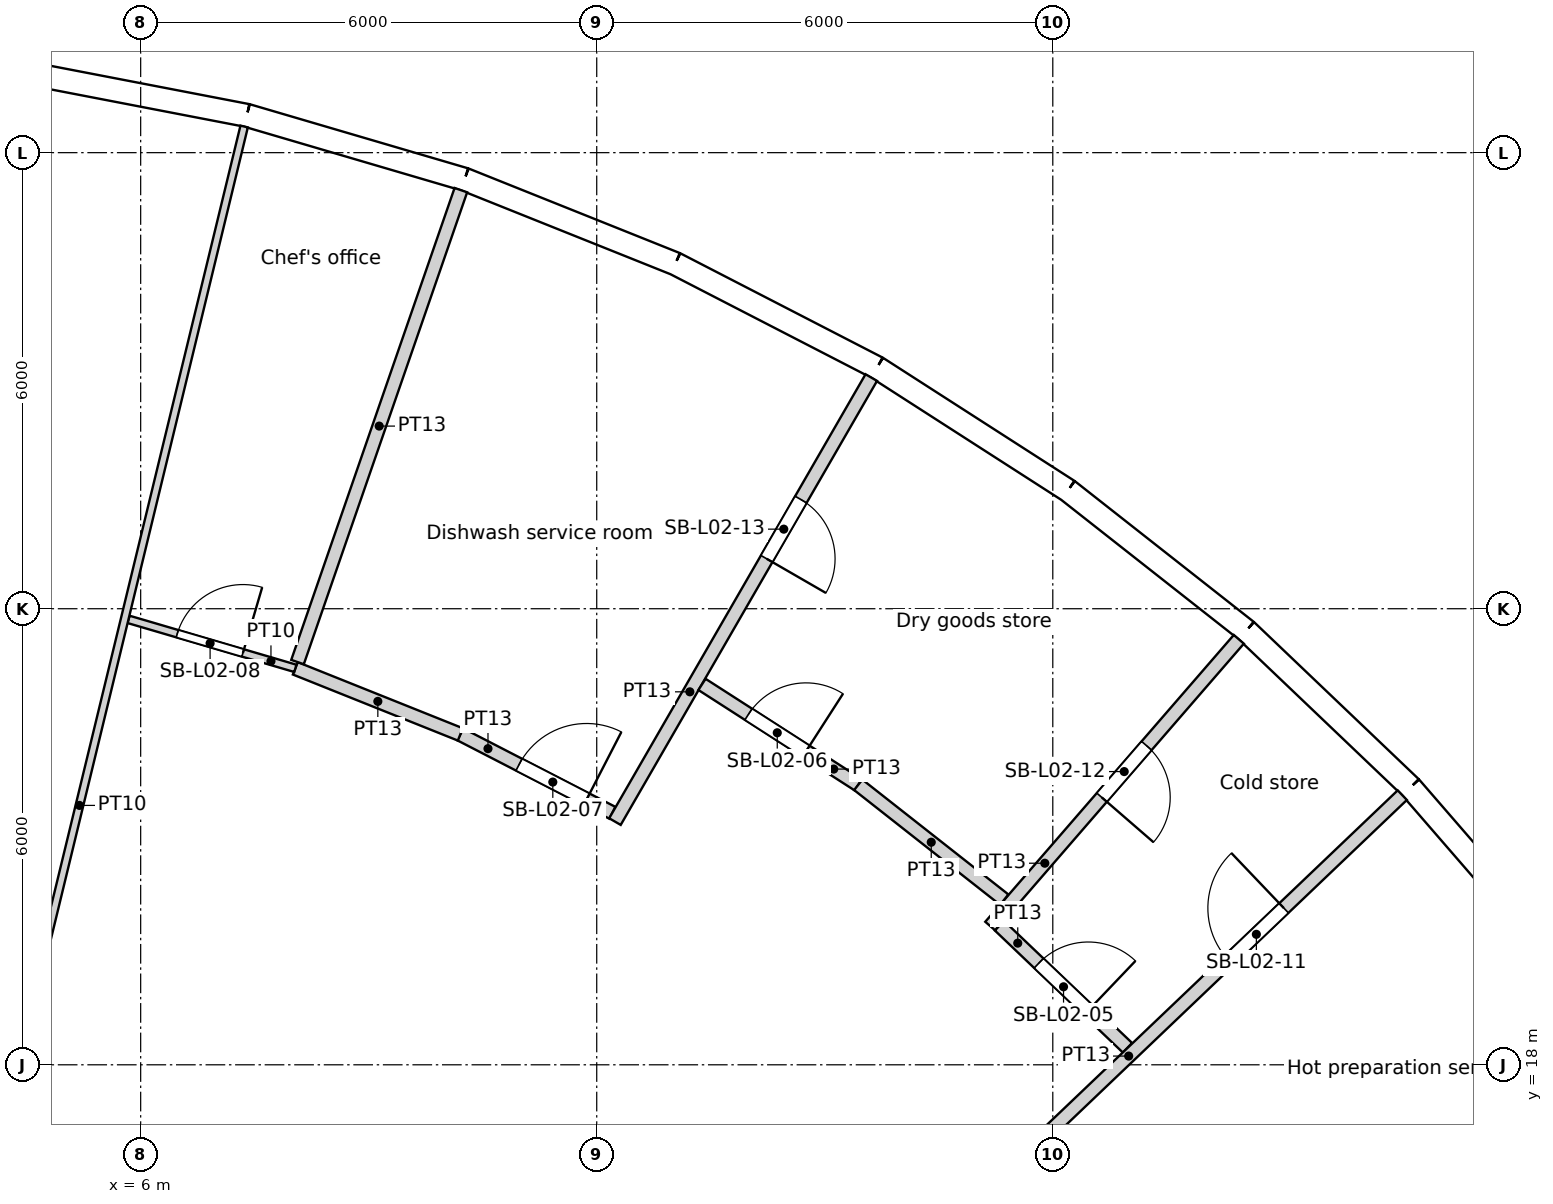
"""IFC4 building model, lengths in metres.
Left out: names, types, materials, properties, quantities, classifications, styles, units other than length and angle.
Written with IfcOpenShell. Run it as: python <this file> out.ifc"""

import sys

from ifc_helpers import new_model, si_unit, direction, frame, frame_2d, origin, origin_2d, place, context, subcontext, project, spatial, rectangle, circle, extrude, element, fill, save


model = new_model("IFC4")
c1 = context("Model", 3, precision=1e-05, world=origin(), true_north=direction((0.0, 1.0)))
c2 = subcontext(c1, "Body", "Model", "MODEL_VIEW")
j1 = project(units=[si_unit("LENGTHUNIT", "METRE"), si_unit("PLANEANGLEUNIT", "RADIAN")], contexts=[c1])
p1 = place(None, origin())
s1 = spatial("IfcSite", under=j1, at=p1, CompositionType="ELEMENT")
p2 = place(p1, origin())
s2 = spatial("IfcBuilding", under=s1, at=p2, CompositionType="ELEMENT")
p3 = place(p2, frame((0.0, 0.0, 13.8)))
s3 = spatial("IfcBuildingStorey", under=s2, at=p3, CompositionType="ELEMENT", Elevation=13.8)
for number, where, z_axis, x_axis in (
    (1, (21.911, 20.892, 0.0), (0.0, 0.0, 1.0), (1.0, 0.0, 0.0)),
    (2, (17.561, 24.661, 0.0), (0.0, 0.0, 1.0), (1.0, 0.0, 0.0)),
    (3, (12.576, 27.539, 0.0), (0.0, 0.0, 1.0), (1.0, 0.0, 0.0)),
    (4, (7.137, 29.421, 0.0), (0.0, 0.0, 1.0), (1.0, 0.0, 0.0)),
):
    element("IfcColumn", number, at=place(p3, frame(where, z_axis=z_axis, x_axis=x_axis)), inside=s3, PredefinedType="COLUMN", context=c2, shape_type="SweptSolid", body=[
        extrude(circle(Radius=0.7, at=origin_2d()), origin(), (0.0, 0.0, 1.0), 4.8),
    ])
for number, where, z_axis, x_axis in (
    (5, (14.659, 19.69, 0.0), (0.0, 0.0, 1.0), (1.0, 0.0, 0.0)),
    (6, (9.723, 22.54, 0.0), (0.0, 0.0, 1.0), (1.0, 0.0, 0.0)),
    (7, (4.263, 24.175, 0.0), (0.0, 0.0, 1.0), (1.0, 0.0, 0.0)),
):
    element("IfcColumn", number, at=place(p3, frame(where, z_axis=z_axis, x_axis=x_axis)), inside=s3, PredefinedType="COLUMN", context=c2, shape_type="SweptSolid", body=[
        extrude(circle(Radius=0.75, at=origin_2d()), origin(), (0.0, 0.0, 1.0), 4.8),
    ])
p4 = place(p3, frame((6.876, 17.521, 0.0), z_axis=(0.0, 0.0, 1.0), x_axis=(1.0, 0.0, 0.0)))
e8 = element("IfcColumn", 8, at=p4, inside=s3, PredefinedType="COLUMN", context=c2, shape_type="SweptSolid", body=[
    extrude(circle(Radius=0.8, at=origin_2d()), origin(), (0.0, 0.0, 1.0), 4.8),
])
p5 = place(p3, frame((24.662, 19.394, 0.0), z_axis=(0.0, 0.0, 1.0), x_axis=(-0.654809121128, 0.755794294029, 0.0)))
e9 = element("IfcWall", 9, at=p5, inside=s3, PredefinedType="SOLIDWALL", context=c2, shape_type="SweptSolid", body=[
    extrude(rectangle(XDim=2.986, YDim=0.3, at=frame_2d((1.493, 0.0))), origin(), (0.0, 0.0, 1.0), 4.35),
])
p6 = place(p5, frame((1.493, 0.0, 2.0)))
e10 = element("IfcOpeningElement", 10, at=p6, cuts=e9, PredefinedType="OPENING", context=c2, shape_type="SweptSolid", body=[
    extrude(circle(Radius=1.2, at=origin_2d()), frame((0.0, 0.16, 0.0), z_axis=(0.0, -1.0, 0.0), x_axis=(1.0, 0.0, 0.0)), (0.0, 0.0, 1.0), 0.32),
])
p7 = place(p3, frame((22.707, 21.651, 0.0), z_axis=(0.0, 0.0, 1.0), x_axis=(-0.723750841228, 0.690061388444, 0.0)))
e11 = element("IfcWall", 11, at=p7, inside=s3, PredefinedType="SOLIDWALL", context=c2, shape_type="SweptSolid", body=[
    extrude(rectangle(XDim=2.986, YDim=0.3, at=frame_2d((1.493, 0.0))), origin(), (0.0, 0.0, 1.0), 4.35),
])
p8 = place(p7, frame((1.493, 0.0, 2.0)))
e12 = element("IfcOpeningElement", 12, at=p8, cuts=e11, PredefinedType="OPENING", context=c2, shape_type="SweptSolid", body=[
    extrude(circle(Radius=1.2, at=origin_2d()), frame((0.0, 0.16, 0.0), z_axis=(0.0, -1.0, 0.0), x_axis=(1.0, 0.0, 0.0)), (0.0, 0.0, 1.0), 0.32),
])
p9 = place(p3, frame((20.546, 23.711, 0.0), z_axis=(0.0, 0.0, 1.0), x_axis=(-0.786043032847, 0.618171780747, 0.0)))
e13 = element("IfcWall", 13, at=p9, inside=s3, PredefinedType="SOLIDWALL", context=c2, shape_type="SweptSolid", body=[
    extrude(rectangle(XDim=2.986, YDim=0.3, at=frame_2d((1.493, 0.0))), origin(), (0.0, 0.0, 1.0), 4.35),
])
p10 = place(p9, frame((1.493, 0.0, 2.0)))
e14 = element("IfcOpeningElement", 14, at=p10, cuts=e13, PredefinedType="OPENING", context=c2, shape_type="SweptSolid", body=[
    extrude(circle(Radius=1.2, at=origin_2d()), frame((0.0, 0.16, 0.0), z_axis=(0.0, -1.0, 0.0), x_axis=(1.0, 0.0, 0.0)), (0.0, 0.0, 1.0), 0.32),
])
p11 = place(p3, frame((18.199, 25.557, 0.0), z_axis=(0.0, 0.0, 1.0), x_axis=(-0.841242231846, 0.540658401727, 0.0)))
e15 = element("IfcWall", 15, at=p11, inside=s3, PredefinedType="SOLIDWALL", context=c2, shape_type="SweptSolid", body=[
    extrude(rectangle(XDim=2.986, YDim=0.3, at=frame_2d((1.493, 0.0))), origin(), (0.0, 0.0, 1.0), 4.35),
])
p12 = place(p11, frame((1.493, 0.0, 2.0)))
e16 = element("IfcOpeningElement", 16, at=p12, cuts=e15, PredefinedType="OPENING", context=c2, shape_type="SweptSolid", body=[
    extrude(circle(Radius=1.2, at=origin_2d()), frame((0.0, 0.16, 0.0), z_axis=(0.0, -1.0, 0.0), x_axis=(1.0, 0.0, 0.0)), (0.0, 0.0, 1.0), 0.32),
])
p13 = place(p3, frame((15.687, 27.171, 0.0), z_axis=(0.0, 0.0, 1.0), x_axis=(-0.888831268481, 0.458234630043, 0.0)))
e17 = element("IfcWall", 17, at=p13, inside=s3, PredefinedType="SOLIDWALL", context=c2, shape_type="SweptSolid", body=[
    extrude(rectangle(XDim=2.986, YDim=0.3, at=frame_2d((1.493, 0.0))), origin(), (0.0, 0.0, 1.0), 4.35),
])
p14 = place(p13, frame((1.493, 0.0, 2.0)))
e18 = element("IfcOpeningElement", 18, at=p14, cuts=e17, PredefinedType="OPENING", context=c2, shape_type="SweptSolid", body=[
    extrude(circle(Radius=1.2, at=origin_2d()), frame((0.0, 0.16, 0.0), z_axis=(0.0, -1.0, 0.0), x_axis=(1.0, 0.0, 0.0)), (0.0, 0.0, 1.0), 0.32),
])
p15 = place(p3, frame((13.033, 28.539, 0.0), z_axis=(0.0, 0.0, 1.0), x_axis=(-0.928380795373, 0.371630325434, 0.0)))
e19 = element("IfcWall", 19, at=p15, inside=s3, PredefinedType="SOLIDWALL", context=c2, shape_type="SweptSolid", body=[
    extrude(rectangle(XDim=2.986, YDim=0.3, at=frame_2d((1.493, 0.0))), origin(), (0.0, 0.0, 1.0), 4.35),
])
p16 = place(p15, frame((1.493, 0.0, 2.0)))
e20 = element("IfcOpeningElement", 20, at=p16, cuts=e19, PredefinedType="OPENING", context=c2, shape_type="SweptSolid", body=[
    extrude(circle(Radius=1.2, at=origin_2d()), frame((0.0, 0.16, 0.0), z_axis=(0.0, -1.0, 0.0), x_axis=(1.0, 0.0, 0.0)), (0.0, 0.0, 1.0), 0.32),
])
p17 = place(p3, frame((10.261, 29.649, 0.0), z_axis=(0.0, 0.0, 1.0), x_axis=(-0.959502108153, 0.281701445593, 0.0)))
e21 = element("IfcWall", 21, at=p17, inside=s3, PredefinedType="SOLIDWALL", context=c2, shape_type="SweptSolid", body=[
    extrude(rectangle(XDim=2.986, YDim=0.3, at=frame_2d((1.493, 0.0))), origin(), (0.0, 0.0, 1.0), 4.35),
])
p18 = place(p17, frame((1.493, 0.0, 2.0)))
e22 = element("IfcOpeningElement", 22, at=p18, cuts=e21, PredefinedType="OPENING", context=c2, shape_type="SweptSolid", body=[
    extrude(circle(Radius=1.2, at=origin_2d()), frame((0.0, 0.16, 0.0), z_axis=(0.0, -1.0, 0.0), x_axis=(1.0, 0.0, 0.0)), (0.0, 0.0, 1.0), 0.32),
])
p19 = place(p3, frame((7.397, 30.49, 0.0), z_axis=(0.0, 0.0, 1.0), x_axis=(-0.981918853666, 0.189302310646, 0.0)))
e23 = element("IfcWall", 23, at=p19, inside=s3, PredefinedType="SOLIDWALL", context=c2, shape_type="SweptSolid", body=[
    extrude(rectangle(XDim=2.986, YDim=0.3, at=frame_2d((1.493, 0.0))), origin(), (0.0, 0.0, 1.0), 4.35),
])
p20 = place(p19, frame((1.493, 0.0, 2.0)))
e24 = element("IfcOpeningElement", 24, at=p20, cuts=e23, PredefinedType="OPENING", context=c2, shape_type="SweptSolid", body=[
    extrude(circle(Radius=1.2, at=origin_2d()), frame((0.0, 0.16, 0.0), z_axis=(0.0, -1.0, 0.0), x_axis=(1.0, 0.0, 0.0)), (0.0, 0.0, 1.0), 0.32),
])
p21 = place(p3, frame((7.361, 30.344, 0.0), z_axis=(0.0, 0.0, 1.0), x_axis=(-0.235757403407, -0.971811940006, 0.0)))
e25 = element("IfcWall", 25, at=p21, inside=s3, PredefinedType="PARTITIONING", context=c2, shape_type="SweptSolid", body=[
    extrude(rectangle(XDim=18.381, YDim=0.1, at=frame_2d((9.19, 0.0))), origin(), (0.0, 0.0, 1.0), 3.75),
])
p22 = place(p3, frame((5.841, 23.86, 0.0), z_axis=(0.0, 0.0, 1.0), x_axis=(0.959479339295, -0.281778986913, 0.0)))
e26 = element("IfcWall", 26, at=p22, inside=s3, PredefinedType="PARTITIONING", context=c2, shape_type="SweptSolid", body=[
    extrude(rectangle(XDim=2.286, YDim=0.1, at=frame_2d((1.143, 0.0))), origin(), (0.0, 0.0, 1.0), 3.75),
])
p23 = place(p22, frame((0.668, 0.0, 0.0)))
e27 = element("IfcOpeningElement", 27, at=p23, cuts=e26, PredefinedType="OPENING", context=c2, shape_type="SweptSolid", body=[
    extrude(rectangle(XDim=0.9, YDim=2.1, at=frame_2d((0.45, 1.05))), frame((0.0, 0.05, 0.0), z_axis=(0.0, -1.0, 0.0), x_axis=(1.0, 0.0, 0.0)), (0.0, 0.0, 1.0), 0.1),
])
p24 = place(p3, frame((10.205, 22.347, 0.0), z_axis=(0.0, 0.0, 1.0), x_axis=(-0.92836862221, 0.371660734133, 0.0)))
e28 = element("IfcWall", 28, at=p24, inside=s3, PredefinedType="PARTITIONING", context=c2, shape_type="SweptSolid", body=[
    extrude(rectangle(XDim=2.338, YDim=0.175, at=frame_2d((1.169, 0.0))), origin(), (0.0, 0.0, 1.0), 3.75),
])
p25 = place(p3, frame((10.212, 29.507, 0.0), z_axis=(0.0, 0.0, 1.0), x_axis=(-0.327042919546, -0.945009486077, 0.0)))
e29 = element("IfcWall", 29, at=p25, inside=s3, PredefinedType="PARTITIONING", context=c2, shape_type="SweptSolid", body=[
    extrude(rectangle(XDim=6.57, YDim=0.175, at=frame_2d((3.285, 0.0))), origin(), (0.0, 0.0, 1.0), 3.75),
])
p26 = place(p3, frame((10.205, 22.347, 0.0), z_axis=(0.0, 0.0, 1.0), x_axis=(0.888825951512, -0.458244943145, 0.0)))
e30 = element("IfcWall", 30, at=p26, inside=s3, PredefinedType="PARTITIONING", context=c2, shape_type="SweptSolid", body=[
    extrude(rectangle(XDim=2.25, YDim=0.175, at=frame_2d((1.125, 0.0))), origin(), (0.0, 0.0, 1.0), 3.75),
])
p27 = place(p26, frame((0.869, 0.0, 0.0)))
e31 = element("IfcOpeningElement", 31, at=p27, cuts=e30, PredefinedType="OPENING", context=c2, shape_type="SweptSolid", body=[
    extrude(rectangle(XDim=1.0, YDim=2.1, at=frame_2d((0.5, 1.05))), frame((0.0, 0.087, 0.0), z_axis=(0.0, -1.0, 0.0), x_axis=(1.0, 0.0, 0.0)), (0.0, 0.0, 1.0), 0.175),
])
p28 = place(p3, frame((13.385, 23.004, 0.0), z_axis=(0.0, 0.0, 1.0), x_axis=(0.841217426126, -0.54069699646, 0.0)))
e32 = element("IfcWall", 32, at=p28, inside=s3, PredefinedType="PARTITIONING", context=c2, shape_type="SweptSolid", body=[
    extrude(rectangle(XDim=2.444, YDim=0.175, at=frame_2d((1.222, 0.0))), origin(), (0.0, 0.0, 1.0), 3.75),
])
p29 = place(p28, frame((0.727, 0.0, 0.0)))
e33 = element("IfcOpeningElement", 33, at=p29, cuts=e32, PredefinedType="OPENING", context=c2, shape_type="SweptSolid", body=[
    extrude(rectangle(XDim=0.9, YDim=2.1, at=frame_2d((0.45, 1.05))), frame((0.0, 0.087, 0.0), z_axis=(0.0, -1.0, 0.0), x_axis=(1.0, 0.0, 0.0)), (0.0, 0.0, 1.0), 0.175),
])
p30 = place(p3, frame((12.24, 21.2, 0.0), z_axis=(0.0, 0.0, 1.0), x_axis=(0.499981470728, 0.8660361014, 0.0)))
e34 = element("IfcWall", 34, at=p30, inside=s3, PredefinedType="PARTITIONING", context=c2, shape_type="SweptSolid", body=[
    extrude(rectangle(XDim=6.745, YDim=0.175, at=frame_2d((3.373, 0.0))), origin(), (0.0, 0.0, 1.0), 3.75),
])
p31 = place(p30, frame((3.992, 0.0, 0.0)))
e35 = element("IfcOpeningElement", 35, at=p31, cuts=e34, PredefinedType="OPENING", context=c2, shape_type="SweptSolid", body=[
    extrude(rectangle(XDim=0.9, YDim=2.1, at=frame_2d((0.45, 1.05))), frame((0.0, 0.087, 0.0), z_axis=(0.0, -1.0, 0.0), x_axis=(1.0, 0.0, 0.0)), (0.0, 0.0, 1.0), 0.175),
])
p32 = place(p3, frame((17.361, 20.173, 0.0), z_axis=(0.0, 0.0, 1.0), x_axis=(-0.786037421758, 0.618178915522, 0.0)))
e36 = element("IfcWall", 36, at=p32, inside=s3, PredefinedType="PARTITIONING", context=c2, shape_type="SweptSolid", body=[
    extrude(rectangle(XDim=2.443, YDim=0.175, at=frame_2d((1.222, 0.0))), origin(), (0.0, 0.0, 1.0), 3.75),
])
p33 = place(p3, frame((17.298, 19.83, 0.0), z_axis=(0.0, 0.0, 1.0), x_axis=(0.723793587031, -0.69001655297, 0.0)))
e37 = element("IfcWall", 37, at=p33, inside=s3, PredefinedType="PARTITIONING", context=c2, shape_type="SweptSolid", body=[
    extrude(rectangle(XDim=2.327, YDim=0.175, at=frame_2d((1.164, 0.0))), origin(), (0.0, 0.0, 1.0), 3.75),
])
p34 = place(p33, frame((0.715, 0.0, 0.0)))
e38 = element("IfcOpeningElement", 38, at=p34, cuts=e37, PredefinedType="OPENING", context=c2, shape_type="SweptSolid", body=[
    extrude(rectangle(XDim=0.9, YDim=2.1, at=frame_2d((0.45, 1.05))), frame((0.0, 0.087, 0.0), z_axis=(0.0, -1.0, 0.0), x_axis=(1.0, 0.0, 0.0)), (0.0, 0.0, 1.0), 0.175),
])
p35 = place(p3, frame((17.178, 19.824, 0.0), z_axis=(0.0, 0.0, 1.0), x_axis=(0.654869105533, 0.755742320251, 0.0)))
e39 = element("IfcWall", 39, at=p35, inside=s3, PredefinedType="PARTITIONING", context=c2, shape_type="SweptSolid", body=[
    extrude(rectangle(XDim=4.993, YDim=0.175, at=frame_2d((2.497, 0.0))), origin(), (0.0, 0.0, 1.0), 3.75),
])
p36 = place(p35, frame((2.24, 0.0, 0.0)))
e40 = element("IfcOpeningElement", 40, at=p36, cuts=e39, PredefinedType="OPENING", context=c2, shape_type="SweptSolid", body=[
    extrude(rectangle(XDim=0.9, YDim=2.1, at=frame_2d((0.45, 1.05))), frame((0.0, 0.087, 0.0), z_axis=(0.0, -1.0, 0.0), x_axis=(1.0, 0.0, 0.0)), (0.0, 0.0, 1.0), 0.175),
])
p37 = place(p3, frame((17.717, 16.893, 0.0), z_axis=(0.0, 0.0, 1.0), x_axis=(0.723737544967, 0.690075333573, 0.0)))
e41 = element("IfcWall", 41, at=p37, inside=s3, PredefinedType="PARTITIONING", context=c2, shape_type="SweptSolid", body=[
    extrude(rectangle(XDim=6.745, YDim=0.175, at=frame_2d((3.373, 0.0))), origin(), (0.0, 0.0, 1.0), 3.75),
])
p38 = place(p37, frame((3.592, 0.0, 0.0)))
e42 = element("IfcOpeningElement", 42, at=p38, cuts=e41, PredefinedType="OPENING", context=c2, shape_type="SweptSolid", body=[
    extrude(rectangle(XDim=1.0, YDim=2.1, at=frame_2d((0.5, 1.05))), frame((0.0, 0.087, 0.0), z_axis=(0.0, -1.0, 0.0), x_axis=(1.0, 0.0, 0.0)), (0.0, 0.0, 1.0), 0.175),
])
p39 = place(p6, origin())
e43 = element("IfcWindow", 43, at=p39, inside=s3, PartitioningType="SINGLE_PANEL", PredefinedType="WINDOW", context=c2, shape_type="SweptSolid", body=[
    extrude(circle(Radius=1.2, at=origin_2d()), frame((0.0, 0.12, 0.0), z_axis=(0.0, -1.0, 0.0), x_axis=(1.0, 0.0, 0.0)), (0.0, 0.0, 1.0), 0.1),
])
fill(e10, e43)
p40 = place(p8, origin())
e44 = element("IfcWindow", 44, at=p40, inside=s3, PartitioningType="SINGLE_PANEL", PredefinedType="WINDOW", context=c2, shape_type="SweptSolid", body=[
    extrude(circle(Radius=1.2, at=origin_2d()), frame((0.0, 0.12, 0.0), z_axis=(0.0, -1.0, 0.0), x_axis=(1.0, 0.0, 0.0)), (0.0, 0.0, 1.0), 0.1),
])
fill(e12, e44)
p41 = place(p10, origin())
e45 = element("IfcWindow", 45, at=p41, inside=s3, PartitioningType="SINGLE_PANEL", PredefinedType="WINDOW", context=c2, shape_type="SweptSolid", body=[
    extrude(circle(Radius=1.2, at=origin_2d()), frame((0.0, 0.12, 0.0), z_axis=(0.0, -1.0, 0.0), x_axis=(1.0, 0.0, 0.0)), (0.0, 0.0, 1.0), 0.1),
])
fill(e14, e45)
p42 = place(p12, origin())
e46 = element("IfcWindow", 46, at=p42, inside=s3, PartitioningType="SINGLE_PANEL", PredefinedType="WINDOW", context=c2, shape_type="SweptSolid", body=[
    extrude(circle(Radius=1.2, at=origin_2d()), frame((0.0, 0.12, 0.0), z_axis=(0.0, -1.0, 0.0), x_axis=(1.0, 0.0, 0.0)), (0.0, 0.0, 1.0), 0.1),
])
fill(e16, e46)
p43 = place(p14, origin())
e47 = element("IfcWindow", 47, at=p43, inside=s3, PartitioningType="SINGLE_PANEL", PredefinedType="WINDOW", context=c2, shape_type="SweptSolid", body=[
    extrude(circle(Radius=1.2, at=origin_2d()), frame((0.0, 0.12, 0.0), z_axis=(0.0, -1.0, 0.0), x_axis=(1.0, 0.0, 0.0)), (0.0, 0.0, 1.0), 0.1),
])
fill(e18, e47)
p44 = place(p16, origin())
e48 = element("IfcWindow", 48, at=p44, inside=s3, PartitioningType="SINGLE_PANEL", PredefinedType="WINDOW", context=c2, shape_type="SweptSolid", body=[
    extrude(circle(Radius=1.2, at=origin_2d()), frame((0.0, 0.12, 0.0), z_axis=(0.0, -1.0, 0.0), x_axis=(1.0, 0.0, 0.0)), (0.0, 0.0, 1.0), 0.1),
])
fill(e20, e48)
p45 = place(p18, origin())
e49 = element("IfcWindow", 49, at=p45, inside=s3, PartitioningType="SINGLE_PANEL", PredefinedType="WINDOW", context=c2, shape_type="SweptSolid", body=[
    extrude(circle(Radius=1.2, at=origin_2d()), frame((0.0, 0.12, 0.0), z_axis=(0.0, -1.0, 0.0), x_axis=(1.0, 0.0, 0.0)), (0.0, 0.0, 1.0), 0.1),
])
fill(e22, e49)
p46 = place(p20, origin())
e50 = element("IfcWindow", 50, at=p46, inside=s3, PartitioningType="SINGLE_PANEL", PredefinedType="WINDOW", context=c2, shape_type="SweptSolid", body=[
    extrude(circle(Radius=1.2, at=origin_2d()), frame((0.0, 0.12, 0.0), z_axis=(0.0, -1.0, 0.0), x_axis=(1.0, 0.0, 0.0)), (0.0, 0.0, 1.0), 0.1),
])
fill(e24, e50)
p47 = place(p34, origin())
e51 = element("IfcDoor", 51, at=p47, inside=s3, OperationType="SINGLE_SWING_RIGHT", PredefinedType="DOOR", context=c2, shape_type="SweptSolid", body=[
    extrude(rectangle(XDim=0.9, YDim=2.1, at=frame_2d((0.45, 1.05))), frame((0.0, 0.025, 0.0), z_axis=(0.0, -1.0, 0.0), x_axis=(1.0, 0.0, 0.0)), (0.0, 0.0, 1.0), 0.05),
])
fill(e38, e51)
p48 = place(p29, origin())
e52 = element("IfcDoor", 52, at=p48, inside=s3, OperationType="SINGLE_SWING_RIGHT", PredefinedType="DOOR", context=c2, shape_type="SweptSolid", body=[
    extrude(rectangle(XDim=0.9, YDim=2.1, at=frame_2d((0.45, 1.05))), frame((0.0, 0.025, 0.0), z_axis=(0.0, -1.0, 0.0), x_axis=(1.0, 0.0, 0.0)), (0.0, 0.0, 1.0), 0.05),
])
fill(e33, e52)
p49 = place(p27, origin())
e53 = element("IfcDoor", 53, at=p49, inside=s3, OperationType="SINGLE_SWING_RIGHT", PredefinedType="DOOR", context=c2, shape_type="SweptSolid", body=[
    extrude(rectangle(XDim=1.0, YDim=2.1, at=frame_2d((0.5, 1.05))), frame((0.0, 0.025, 0.0), z_axis=(0.0, -1.0, 0.0), x_axis=(1.0, 0.0, 0.0)), (0.0, 0.0, 1.0), 0.05),
])
fill(e31, e53)
p50 = place(p23, origin())
e54 = element("IfcDoor", 54, at=p50, inside=s3, OperationType="SINGLE_SWING_RIGHT", PredefinedType="DOOR", context=c2, shape_type="SweptSolid", body=[
    extrude(rectangle(XDim=0.9, YDim=2.1, at=frame_2d((0.45, 1.05))), frame((0.0, 0.025, 0.0), z_axis=(0.0, -1.0, 0.0), x_axis=(1.0, 0.0, 0.0)), (0.0, 0.0, 1.0), 0.05),
])
fill(e27, e54)
p51 = place(p38, origin())
e55 = element("IfcDoor", 55, at=p51, inside=s3, OperationType="SINGLE_SWING_RIGHT", PredefinedType="DOOR", context=c2, shape_type="SweptSolid", body=[
    extrude(rectangle(XDim=1.0, YDim=2.1, at=frame_2d((0.5, 1.05))), frame((0.0, 0.025, 0.0), z_axis=(0.0, -1.0, 0.0), x_axis=(1.0, 0.0, 0.0)), (0.0, 0.0, 1.0), 0.05),
])
fill(e42, e55)
p52 = place(p36, origin())
e56 = element("IfcDoor", 56, at=p52, inside=s3, OperationType="SINGLE_SWING_RIGHT", PredefinedType="DOOR", context=c2, shape_type="SweptSolid", body=[
    extrude(rectangle(XDim=0.9, YDim=2.1, at=frame_2d((0.45, 1.05))), frame((0.0, 0.025, 0.0), z_axis=(0.0, -1.0, 0.0), x_axis=(1.0, 0.0, 0.0)), (0.0, 0.0, 1.0), 0.05),
])
fill(e40, e56)
p53 = place(p31, origin())
e57 = element("IfcDoor", 57, at=p53, inside=s3, OperationType="SINGLE_SWING_RIGHT", PredefinedType="DOOR", context=c2, shape_type="SweptSolid", body=[
    extrude(rectangle(XDim=0.9, YDim=2.1, at=frame_2d((0.45, 1.05))), frame((0.0, 0.025, 0.0), z_axis=(0.0, -1.0, 0.0), x_axis=(1.0, 0.0, 0.0)), (0.0, 0.0, 1.0), 0.05),
])
fill(e35, e57)
save(model, sys.argv[1])
